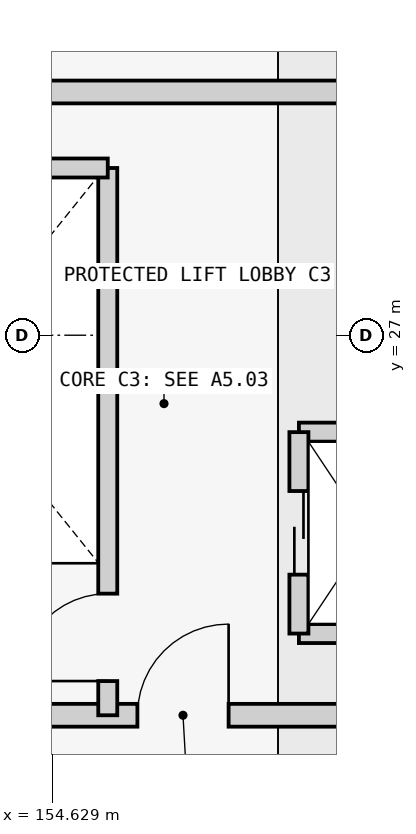
"""IFC4 building model, lengths in metres.
Left out: names, types, materials, properties, quantities, classifications, styles, units other than length and angle.
Written with IfcOpenShell. Run it as: python <this file> out.ifc"""

import sys

from ifc_helpers import new_model, si_unit, direction, frame, frame_2d, origin, place, context, subcontext, project, spatial, rectangle, extrude, element, fill, save


model = new_model("IFC4")
c1 = context("Model", 3, precision=1e-05, world=origin(), true_north=direction((0.0, 1.0)))
c2 = subcontext(c1, "Body", "Model", "MODEL_VIEW")
j1 = project(units=[si_unit("LENGTHUNIT", "METRE"), si_unit("PLANEANGLEUNIT", "RADIAN")], contexts=[c1])
p1 = place(None, origin())
s1 = spatial("IfcSite", under=j1, at=p1, CompositionType="ELEMENT")
p2 = place(p1, origin())
s2 = spatial("IfcBuilding", under=s1, at=p2, CompositionType="ELEMENT")
p3 = place(p2, frame((0.0, 0.0, 25.2)))
s3 = spatial("IfcBuildingStorey", under=s2, at=p3, CompositionType="ELEMENT", Elevation=25.2)
p4 = place(p3, frame((151.0, 22.0, 0.0), z_axis=(0.0, 0.0, 1.0), x_axis=(1.0, 0.0, 0.0)))
e1 = element("IfcWall", 1, at=p4, inside=s3, PredefinedType="SHEAR", context=c2, shape_type="SweptSolid", body=[
    extrude(rectangle(XDim=10.2, YDim=0.3, at=frame_2d((5.1, 0.0))), origin(), (0.0, 0.0, 1.0), 3.96),
])
p5 = place(p4, frame((4.75, 0.0, 0.0)))
e2 = element("IfcOpeningElement", 2, at=p5, cuts=e1, PredefinedType="OPENING", context=c2, shape_type="SweptSolid", body=[
    extrude(rectangle(XDim=1.2, YDim=2.15, at=frame_2d((0.6, 1.075))), frame((0.0, 0.16, 0.0), z_axis=(0.0, -1.0, 0.0), x_axis=(1.0, 0.0, 0.0)), (0.0, 0.0, 1.0), 0.32),
])
p6 = place(p3, frame((161.2, 30.2, 0.0), z_axis=(0.0, 0.0, 1.0), x_axis=(-1.0, 0.0, 0.0)))
e3 = element("IfcWall", 3, at=p6, inside=s3, PredefinedType="SHEAR", context=c2, shape_type="SweptSolid", body=[
    extrude(rectangle(XDim=10.2, YDim=0.3, at=frame_2d((5.1, 0.0))), origin(), (0.0, 0.0, 1.0), 3.96),
])
p7 = place(p3, frame((155.36, 22.0, 0.0), z_axis=(0.0, 0.0, 1.0), x_axis=(0.0, 1.0, 0.0)))
e4 = element("IfcWall", 4, at=p7, inside=s3, PredefinedType="SHEAR", context=c2, shape_type="SweptSolid", body=[
    extrude(rectangle(XDim=7.2, YDim=0.25, at=frame_2d((3.6, 0.0))), origin(), (0.0, 0.0, 1.0), 3.96),
])
p8 = place(p7, frame((0.45, 0.0, 0.0)))
e5 = element("IfcOpeningElement", 5, at=p8, cuts=e4, PredefinedType="OPENING", context=c2, shape_type="SweptSolid", body=[
    extrude(rectangle(XDim=1.15, YDim=2.15, at=frame_2d((0.575, 1.075))), frame((0.0, 0.135, 0.0), z_axis=(0.0, -1.0, 0.0), x_axis=(1.0, 0.0, 0.0)), (0.0, 0.0, 1.0), 0.27),
])
p9 = place(p3, frame((151.0, 29.2, 0.0), z_axis=(0.0, 0.0, 1.0), x_axis=(1.0, 0.0, 0.0)))
e6 = element("IfcWall", 6, at=p9, inside=s3, PredefinedType="SHEAR", context=c2, shape_type="SweptSolid", body=[
    extrude(rectangle(XDim=4.36, YDim=0.25, at=frame_2d((2.18, 0.0))), origin(), (0.0, 0.0, 1.0), 3.96),
])
for number, where, z_axis, x_axis in (
    (7, (157.875, 23.075, 0.0), (0.0, 0.0, 1.0), (1.0, 0.0, 0.0)),
    (8, (157.875, 25.725, 0.0), (0.0, 0.0, 1.0), (1.0, 0.0, 0.0)),
):
    element("IfcWall", number, at=place(p3, frame(where, z_axis=z_axis, x_axis=x_axis)), inside=s3, PredefinedType="SHEAR", context=c2, shape_type="SweptSolid", body=[
        extrude(rectangle(XDim=1.85, YDim=0.25, at=frame_2d((0.925, 0.0))), origin(), (0.0, 0.0, 1.0), 3.96),
    ])
p10 = place(p3, frame((157.875, 23.075, 0.0), z_axis=(0.0, 0.0, 1.0), x_axis=(0.0, 1.0, 0.0)))
e9 = element("IfcWall", 9, at=p10, inside=s3, PredefinedType="SHEAR", context=c2, shape_type="SweptSolid", body=[
    extrude(rectangle(XDim=2.65, YDim=0.25, at=frame_2d((1.325, 0.0))), origin(), (0.0, 0.0, 1.0), 3.96),
])
p11 = place(p10, frame((0.775, 0.0, 0.0)))
e10 = element("IfcOpeningElement", 10, at=p11, cuts=e9, PredefinedType="OPENING", context=c2, shape_type="SweptSolid", body=[
    extrude(rectangle(XDim=1.1, YDim=2.15, at=frame_2d((0.55, 1.075))), frame((0.0, 0.135, 0.0), z_axis=(0.0, -1.0, 0.0), x_axis=(1.0, 0.0, 0.0)), (0.0, 0.0, 1.0), 0.27),
])
p12 = place(p8, origin())
e11 = element("IfcDoor", 11, at=p12, inside=s3, OperationType="SINGLE_SWING_LEFT", PredefinedType="DOOR", context=c2, shape_type="SweptSolid", body=[
    extrude(rectangle(XDim=1.15, YDim=2.15, at=frame_2d((0.575, 1.075))), frame((0.0, 0.025, 0.0), z_axis=(0.0, -1.0, 0.0), x_axis=(1.0, 0.0, 0.0)), (0.0, 0.0, 1.0), 0.05),
])
fill(e5, e11)
p13 = place(p5, origin())
e12 = element("IfcDoor", 12, at=p13, inside=s3, OperationType="SINGLE_SWING_RIGHT", PredefinedType="DOOR", context=c2, shape_type="SweptSolid", body=[
    extrude(rectangle(XDim=1.2, YDim=2.15, at=frame_2d((0.6, 1.075))), frame((0.0, 0.025, 0.0), z_axis=(0.0, -1.0, 0.0), x_axis=(1.0, 0.0, 0.0)), (0.0, 0.0, 1.0), 0.05),
])
fill(e2, e12)
p14 = place(p11, origin())
e13 = element("IfcDoor", 13, at=p14, inside=s3, OperationType="DOUBLE_DOOR_SLIDING", PredefinedType="USERDEFINED", context=c2, shape_type="SweptSolid", body=[
    extrude(rectangle(XDim=1.1, YDim=2.15, at=frame_2d((0.55, 1.075))), frame((0.0, 0.025, 0.0), z_axis=(0.0, -1.0, 0.0), x_axis=(1.0, 0.0, 0.0)), (0.0, 0.0, 1.0), 0.05),
])
fill(e10, e13)
save(model, sys.argv[1])
